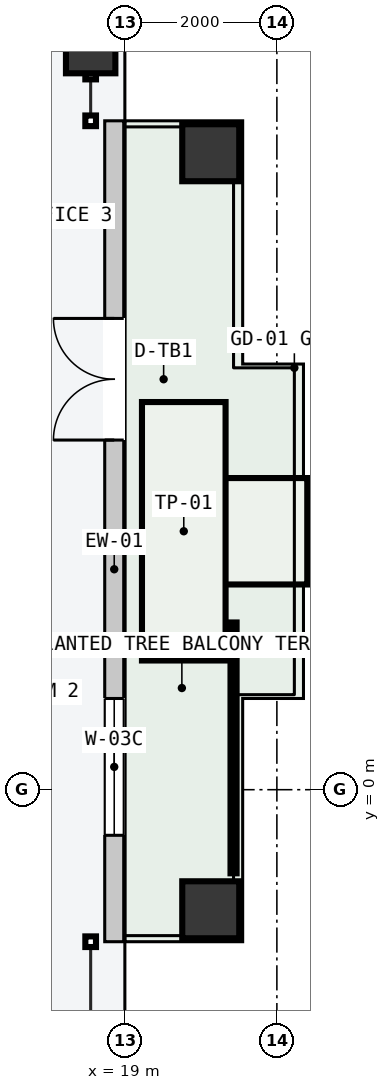
"""IFC4 building model, lengths in metres.
Left out: names, types, materials, properties, quantities, classifications, styles, units other than length and angle.
Written with IfcOpenShell. Run it as: python <this file> out.ifc"""

import sys

from ifc_helpers import new_model, si_unit, direction, frame, frame_2d, origin, origin_2d, place, context, subcontext, project, spatial, rectangle, hollow_rectangle, extrude, element, fill, save


model = new_model("IFC4")
c1 = context("Model", 3, precision=1e-05, world=origin(), true_north=direction((0.0, 1.0)))
c2 = subcontext(c1, "Body", "Model", "MODEL_VIEW")
j1 = project(units=[si_unit("LENGTHUNIT", "METRE"), si_unit("PLANEANGLEUNIT", "RADIAN")], contexts=[c1])
p1 = place(None, origin())
s1 = spatial("IfcSite", under=j1, at=p1, CompositionType="ELEMENT")
p2 = place(p1, origin())
s2 = spatial("IfcBuilding", under=s1, at=p2, CompositionType="ELEMENT")
p3 = place(p2, frame((0.0, 0.0, 236.4)))
s3 = spatial("IfcBuildingStorey", under=s2, at=p3, CompositionType="ELEMENT", Elevation=236.4)
p4 = place(p3, frame((18.55, 9.75, 0.0), z_axis=(0.0, 0.0, 1.0), x_axis=(0.0, 1.0, 0.0)))
e1 = element("IfcColumn", 1, at=p4, inside=s3, PredefinedType="COLUMN", context=c2, shape_type="SweptSolid", body=[
    extrude(hollow_rectangle(XDim=0.65, YDim=0.65, WallThickness=0.028, at=origin_2d()), origin(), (0.0, 0.0, 1.0), 3.6),
])
for number, where, z_axis, x_axis in (
    (2, (20.13, -1.58, 0.0), (0.0, 0.0, 1.0), (0.0, 1.0, 0.0)),
    (3, (20.13, 8.38, 0.0), (0.0, 0.0, 1.0), (0.0, 1.0, 0.0)),
):
    element("IfcColumn", number, at=place(p3, frame(where, z_axis=z_axis, x_axis=x_axis)), inside=s3, PredefinedType="COLUMN", context=c2, shape_type="SweptSolid", body=[
        extrude(hollow_rectangle(XDim=0.75, YDim=0.75, WallThickness=0.032, at=origin_2d()), origin(), (0.0, 0.0, 1.0), 3.6),
    ])
p5 = place(p3, frame((18.86, -2.0, 0.0), z_axis=(0.0, 0.0, 1.0), x_axis=(0.0, 1.0, 0.0)))
e4 = element("IfcWall", 4, at=p5, inside=s3, PredefinedType="STANDARD", context=c2, shape_type="SweptSolid", body=[
    extrude(rectangle(XDim=10.8, YDim=0.25, at=frame_2d((5.4, 0.0))), origin(), (0.0, 0.0, 1.0), 3.4),
])
p6 = place(p5, frame((6.6, 0.0, 0.0)))
e5 = element("IfcOpeningElement", 5, at=p6, cuts=e4, PredefinedType="OPENING", context=c2, shape_type="SweptSolid", body=[
    extrude(rectangle(XDim=1.6, YDim=2.2, at=frame_2d((0.8, 1.1))), frame((0.0, 0.135, 0.0), z_axis=(0.0, -1.0, 0.0), x_axis=(1.0, 0.0, 0.0)), (0.0, 0.0, 1.0), 0.27),
])
p7 = place(p5, frame((1.4, 0.0, 0.85)))
e6 = element("IfcOpeningElement", 6, at=p7, cuts=e4, PredefinedType="OPENING", context=c2, shape_type="SweptSolid", body=[
    extrude(rectangle(XDim=1.8, YDim=2.05, at=frame_2d((0.9, 1.025))), frame((0.0, 0.135, 0.0), z_axis=(0.0, -1.0, 0.0), x_axis=(1.0, 0.0, 0.0)), (0.0, 0.0, 1.0), 0.27),
])
p8 = place(p6, origin())
e7 = element("IfcDoor", 7, at=p8, inside=s3, OperationType="DOUBLE_DOOR_SINGLE_SWING", PredefinedType="DOOR", context=c2, shape_type="SweptSolid", body=[
    extrude(rectangle(XDim=1.6, YDim=2.2, at=frame_2d((0.8, 1.1))), frame((0.0, 0.025, 0.0), z_axis=(0.0, -1.0, 0.0), x_axis=(1.0, 0.0, 0.0)), (0.0, 0.0, 1.0), 0.05),
])
fill(e5, e7)
p9 = place(p7, origin())
e8 = element("IfcWindow", 8, at=p9, inside=s3, PartitioningType="SINGLE_PANEL", PredefinedType="WINDOW", context=c2, shape_type="SweptSolid", body=[
    extrude(rectangle(XDim=1.8, YDim=2.05, at=frame_2d((0.9, 1.025))), frame((0.0, 0.03, 0.0), z_axis=(0.0, -1.0, 0.0), x_axis=(1.0, 0.0, 0.0)), (0.0, 0.0, 1.0), 0.06),
])
fill(e6, e8)
save(model, sys.argv[1])
